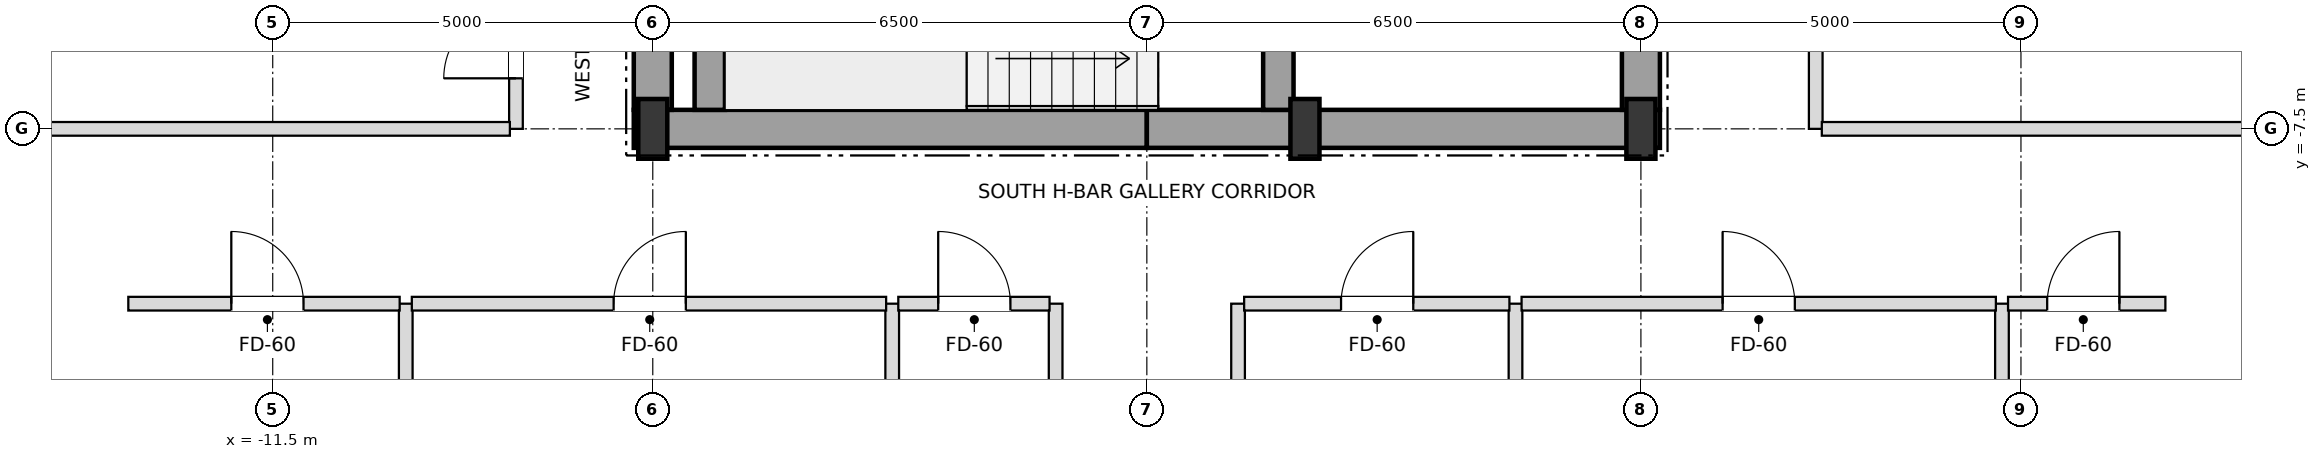
"""IFC4 building model, lengths in metres.
Left out: names, types, materials, properties, quantities, classifications, styles, units other than length and angle.
Written with IfcOpenShell. Run it as: python <this file> out.ifc"""

import sys

from ifc_helpers import new_model, si_unit, direction, frame, frame_2d, origin, origin_2d, place, context, subcontext, project, spatial, rectangle, i_section, extrude, element, fill, save


model = new_model("IFC4")
c1 = context("Model", 3, precision=1e-05, world=origin(), true_north=direction((0.0, 1.0)))
c2 = subcontext(c1, "Body", "Model", "MODEL_VIEW")
j1 = project(units=[si_unit("LENGTHUNIT", "METRE"), si_unit("PLANEANGLEUNIT", "RADIAN")], contexts=[c1])
p1 = place(None, origin())
s1 = spatial("IfcSite", under=j1, at=p1, CompositionType="ELEMENT")
p2 = place(p1, origin())
s2 = spatial("IfcBuilding", under=s1, at=p2, CompositionType="ELEMENT")
p3 = place(p2, frame((0.0, 0.0, 208.8)))
s3 = spatial("IfcBuildingStorey", under=s2, at=p3, CompositionType="ELEMENT", Elevation=208.8)
for number, where, z_axis, x_axis in (
    (1, (-6.5, -7.5, 0.0), (0.0, 0.0, 1.0), (1.0, 0.0, 0.0)),
    (2, (2.08, -7.5, 0.0), (0.0, 0.0, 1.0), (1.0, 0.0, 0.0)),
    (3, (6.5, -7.5, 0.0), (0.0, 0.0, 1.0), (1.0, 0.0, 0.0)),
):
    element("IfcColumn", number, at=place(p3, frame(where, z_axis=z_axis, x_axis=x_axis)), inside=s3, PredefinedType="COLUMN", context=c2, shape_type="SweptSolid", body=[
        extrude(i_section(OverallWidth=0.382, OverallDepth=0.786, WebThickness=0.02, FlangeThickness=0.033, at=origin_2d()), origin(), (0.0, 0.0, 1.0), 3.6),
    ])
for number, where, z_axis, x_axis in (
    (4, (-6.75, -7.5, 0.0), (0.0, 0.0, 1.0), (1.0, 0.0, 0.0)),
    (5, (0.0, -7.5, 0.0), (0.0, 0.0, 1.0), (1.0, 0.0, 0.0)),
):
    element("IfcWall", number, at=place(p3, frame(where, z_axis=z_axis, x_axis=x_axis)), inside=s3, PredefinedType="SHEAR", context=c2, shape_type="SweptSolid", body=[
        extrude(rectangle(XDim=6.75, YDim=0.5, at=frame_2d((3.375, 0.0))), origin(), (0.0, 0.0, 1.0), 3.3),
    ])
p4 = place(p3, frame((-6.5, -7.25, 0.0), z_axis=(0.0, 0.0, 1.0), x_axis=(0.0, 1.0, 0.0)))
e6 = element("IfcWall", 6, at=p4, inside=s3, PredefinedType="SHEAR", context=c2, shape_type="SweptSolid", body=[
    extrude(rectangle(XDim=3.55, YDim=0.5, at=frame_2d((1.775, 0.0))), origin(), (0.0, 0.0, 1.0), 3.3),
])
p5 = place(p3, frame((6.5, -7.25, 0.0), z_axis=(0.0, 0.0, 1.0), x_axis=(0.0, 1.0, 0.0)))
e7 = element("IfcWall", 7, at=p5, inside=s3, PredefinedType="SHEAR", context=c2, shape_type="SweptSolid", body=[
    extrude(rectangle(XDim=5.75, YDim=0.5, at=frame_2d((2.875, 0.0))), origin(), (0.0, 0.0, 1.0), 3.3),
])
p6 = place(p5, frame((0.85, 0.0, 0.0)))
e8 = element("IfcOpeningElement", 8, at=p6, cuts=e7, PredefinedType="OPENING", context=c2, shape_type="SweptSolid", body=[
    extrude(rectangle(XDim=1.05, YDim=2.15, at=frame_2d((0.525, 1.075))), frame((0.0, 0.26, 0.0), z_axis=(0.0, -1.0, 0.0), x_axis=(1.0, 0.0, 0.0)), (0.0, 0.0, 1.0), 0.52),
])
p7 = place(p3, frame((-5.75, -7.25, 0.0), z_axis=(0.0, 0.0, 1.0), x_axis=(0.0, 1.0, 0.0)))
e9 = element("IfcWall", 9, at=p7, inside=s3, PredefinedType="SHEAR", context=c2, shape_type="SweptSolid", body=[
    extrude(rectangle(XDim=2.9, YDim=0.4, at=frame_2d((1.45, 0.0))), origin(), (0.0, 0.0, 1.0), 3.3),
])
p8 = place(p3, frame((1.73, -7.25, 0.0), z_axis=(0.0, 0.0, 1.0), x_axis=(0.0, 1.0, 0.0)))
e10 = element("IfcWall", 10, at=p8, inside=s3, PredefinedType="SHEAR", context=c2, shape_type="SweptSolid", body=[
    extrude(rectangle(XDim=3.3, YDim=0.4, at=frame_2d((1.65, 0.0))), origin(), (0.0, 0.0, 1.0), 3.3),
])
p9 = place(p8, frame((0.9, 0.0, 0.0)))
e11 = element("IfcOpeningElement", 11, at=p9, cuts=e10, PredefinedType="OPENING", context=c2, shape_type="SweptSolid", body=[
    extrude(rectangle(XDim=1.05, YDim=2.15, at=frame_2d((0.525, 1.075))), frame((0.0, 0.21, 0.0), z_axis=(0.0, -1.0, 0.0), x_axis=(1.0, 0.0, 0.0)), (0.0, 0.0, 1.0), 0.42),
])
p10 = place(p3, frame((-9.75, -21.4, 0.0), z_axis=(0.0, 0.0, 1.0), x_axis=(0.0, 1.0, 0.0)))
e12 = element("IfcWall", 12, at=p10, inside=s3, PredefinedType="PARTITIONING", context=c2, shape_type="SweptSolid", body=[
    extrude(rectangle(XDim=11.6, YDim=0.18, at=frame_2d((5.8, 0.0))), origin(), (0.0, 0.0, 1.0), 2.746),
])
p11 = place(p3, frame((-8.3, -7.5, 0.0), z_axis=(0.0, 0.0, 1.0), x_axis=(0.0, 1.0, 0.0)))
e13 = element("IfcWall", 13, at=p11, inside=s3, PredefinedType="PARTITIONING", context=c2, shape_type="SweptSolid", body=[
    extrude(rectangle(XDim=15.0, YDim=0.18, at=frame_2d((7.5, 0.0))), origin(), (0.0, 0.0, 1.0), 3.3),
])
p12 = place(p11, frame((0.665, 0.0, 0.0)))
e14 = element("IfcOpeningElement", 14, at=p12, cuts=e13, PredefinedType="OPENING", context=c2, shape_type="SweptSolid", body=[
    extrude(rectangle(XDim=0.95, YDim=2.15, at=frame_2d((0.475, 1.075))), frame((0.0, 0.1, 0.0), z_axis=(0.0, -1.0, 0.0), x_axis=(1.0, 0.0, 0.0)), (0.0, 0.0, 1.0), 0.2),
])
p13 = place(p11, frame((2.665, 0.0, 0.0)))
e15 = element("IfcOpeningElement", 15, at=p13, cuts=e13, PredefinedType="OPENING", context=c2, shape_type="SweptSolid", body=[
    extrude(rectangle(XDim=0.95, YDim=2.15, at=frame_2d((0.475, 1.075))), frame((0.0, 0.1, 0.0), z_axis=(0.0, -1.0, 0.0), x_axis=(1.0, 0.0, 0.0)), (0.0, 0.0, 1.0), 0.2),
])
for number, where, z_axis, x_axis in (
    (16, (-3.35, -21.4, 0.0), (0.0, 0.0, 1.0), (0.0, 1.0, 0.0)),
    (17, (-1.2, -21.4, 0.0), (0.0, 0.0, 1.0), (0.0, 1.0, 0.0)),
    (18, (1.2, -21.4, 0.0), (0.0, 0.0, 1.0), (0.0, 1.0, 0.0)),
    (19, (4.85, -21.4, 0.0), (0.0, 0.0, 1.0), (0.0, 1.0, 0.0)),
):
    element("IfcWall", number, at=place(p3, frame(where, z_axis=z_axis, x_axis=x_axis)), inside=s3, PredefinedType="PARTITIONING", context=c2, shape_type="SweptSolid", body=[
        extrude(rectangle(XDim=11.6, YDim=0.18, at=frame_2d((5.8, 0.0))), origin(), (0.0, 0.0, 1.0), 2.746),
    ])
p14 = place(p3, frame((8.8, -7.5, 0.0), z_axis=(0.0, 0.0, 1.0), x_axis=(0.0, 1.0, 0.0)))
e20 = element("IfcWall", 20, at=p14, inside=s3, PredefinedType="PARTITIONING", context=c2, shape_type="SweptSolid", body=[
    extrude(rectangle(XDim=15.0, YDim=0.18, at=frame_2d((7.5, 0.0))), origin(), (0.0, 0.0, 1.0), 3.3),
])
p15 = place(p14, frame((2.075, 0.0, 0.0)))
e21 = element("IfcOpeningElement", 21, at=p15, cuts=e20, PredefinedType="OPENING", context=c2, shape_type="SweptSolid", body=[
    extrude(rectangle(XDim=0.95, YDim=2.15, at=frame_2d((0.475, 1.075))), frame((0.0, 0.1, 0.0), z_axis=(0.0, -1.0, 0.0), x_axis=(1.0, 0.0, 0.0)), (0.0, 0.0, 1.0), 0.2),
])
p16 = place(p14, frame((8.325, 0.0, 0.0)))
e22 = element("IfcOpeningElement", 22, at=p16, cuts=e20, PredefinedType="OPENING", context=c2, shape_type="SweptSolid", body=[
    extrude(rectangle(XDim=0.95, YDim=2.15, at=frame_2d((0.475, 1.075))), frame((0.0, 0.1, 0.0), z_axis=(0.0, -1.0, 0.0), x_axis=(1.0, 0.0, 0.0)), (0.0, 0.0, 1.0), 0.2),
])
p17 = place(p14, frame((13.275, 0.0, 0.0)))
e23 = element("IfcOpeningElement", 23, at=p17, cuts=e20, PredefinedType="OPENING", context=c2, shape_type="SweptSolid", body=[
    extrude(rectangle(XDim=0.95, YDim=2.15, at=frame_2d((0.475, 1.075))), frame((0.0, 0.1, 0.0), z_axis=(0.0, -1.0, 0.0), x_axis=(1.0, 0.0, 0.0)), (0.0, 0.0, 1.0), 0.2),
])
p18 = place(p3, frame((11.25, -21.4, 0.0), z_axis=(0.0, 0.0, 1.0), x_axis=(0.0, 1.0, 0.0)))
e24 = element("IfcWall", 24, at=p18, inside=s3, PredefinedType="PARTITIONING", context=c2, shape_type="SweptSolid", body=[
    extrude(rectangle(XDim=11.6, YDim=0.18, at=frame_2d((5.8, 0.0))), origin(), (0.0, 0.0, 1.0), 2.59),
])
p19 = place(p3, frame((-13.4, -9.8, 0.0), z_axis=(0.0, 0.0, 1.0), x_axis=(1.0, 0.0, 0.0)))
e25 = element("IfcWall", 25, at=p19, inside=s3, PredefinedType="PARTITIONING", context=c2, shape_type="SweptSolid", body=[
    extrude(rectangle(XDim=3.57, YDim=0.18, at=frame_2d((1.785, 0.0))), origin(), (0.0, 0.0, 1.0), 3.3),
])
p20 = place(p19, frame((1.355, 0.0, 0.0)))
e26 = element("IfcOpeningElement", 26, at=p20, cuts=e25, PredefinedType="OPENING", context=c2, shape_type="SweptSolid", body=[
    extrude(rectangle(XDim=0.95, YDim=2.15, at=frame_2d((0.475, 1.075))), frame((0.0, 0.1, 0.0), z_axis=(0.0, -1.0, 0.0), x_axis=(1.0, 0.0, 0.0)), (0.0, 0.0, 1.0), 0.2),
])
p21 = place(p3, frame((-9.67, -9.8, 0.0), z_axis=(0.0, 0.0, 1.0), x_axis=(1.0, 0.0, 0.0)))
e27 = element("IfcWall", 27, at=p21, inside=s3, PredefinedType="PARTITIONING", context=c2, shape_type="SweptSolid", body=[
    extrude(rectangle(XDim=6.24, YDim=0.18, at=frame_2d((3.12, 0.0))), origin(), (0.0, 0.0, 1.0), 2.746),
])
p22 = place(p21, frame((2.655, 0.0, 0.0)))
e28 = element("IfcOpeningElement", 28, at=p22, cuts=e27, PredefinedType="OPENING", context=c2, shape_type="SweptSolid", body=[
    extrude(rectangle(XDim=0.95, YDim=2.15, at=frame_2d((0.475, 1.075))), frame((0.0, 0.1, 0.0), z_axis=(0.0, -1.0, 0.0), x_axis=(1.0, 0.0, 0.0)), (0.0, 0.0, 1.0), 0.2),
])
p23 = place(p3, frame((-3.27, -9.8, 0.0), z_axis=(0.0, 0.0, 1.0), x_axis=(1.0, 0.0, 0.0)))
e29 = element("IfcWall", 29, at=p23, inside=s3, PredefinedType="PARTITIONING", context=c2, shape_type="SweptSolid", body=[
    extrude(rectangle(XDim=1.99, YDim=0.18, at=frame_2d((0.995, 0.0))), origin(), (0.0, 0.0, 1.0), 3.3),
])
p24 = place(p23, frame((0.525, 0.0, 0.0)))
e30 = element("IfcOpeningElement", 30, at=p24, cuts=e29, PredefinedType="OPENING", context=c2, shape_type="SweptSolid", body=[
    extrude(rectangle(XDim=0.95, YDim=2.15, at=frame_2d((0.475, 1.075))), frame((0.0, 0.1, 0.0), z_axis=(0.0, -1.0, 0.0), x_axis=(1.0, 0.0, 0.0)), (0.0, 0.0, 1.0), 0.2),
])
p25 = place(p3, frame((1.28, -9.8, 0.0), z_axis=(0.0, 0.0, 1.0), x_axis=(1.0, 0.0, 0.0)))
e31 = element("IfcWall", 31, at=p25, inside=s3, PredefinedType="PARTITIONING", context=c2, shape_type="SweptSolid", body=[
    extrude(rectangle(XDim=3.49, YDim=0.18, at=frame_2d((1.745, 0.0))), origin(), (0.0, 0.0, 1.0), 3.3),
])
p26 = place(p25, frame((1.275, 0.0, 0.0)))
e32 = element("IfcOpeningElement", 32, at=p26, cuts=e31, PredefinedType="OPENING", context=c2, shape_type="SweptSolid", body=[
    extrude(rectangle(XDim=0.95, YDim=2.15, at=frame_2d((0.475, 1.075))), frame((0.0, 0.1, 0.0), z_axis=(0.0, -1.0, 0.0), x_axis=(1.0, 0.0, 0.0)), (0.0, 0.0, 1.0), 0.2),
])
p27 = place(p3, frame((4.93, -9.8, 0.0), z_axis=(0.0, 0.0, 1.0), x_axis=(1.0, 0.0, 0.0)))
e33 = element("IfcWall", 33, at=p27, inside=s3, PredefinedType="PARTITIONING", context=c2, shape_type="SweptSolid", body=[
    extrude(rectangle(XDim=6.24, YDim=0.18, at=frame_2d((3.12, 0.0))), origin(), (0.0, 0.0, 1.0), 2.746),
])
p28 = place(p27, frame((2.645, 0.0, 0.0)))
e34 = element("IfcOpeningElement", 34, at=p28, cuts=e33, PredefinedType="OPENING", context=c2, shape_type="SweptSolid", body=[
    extrude(rectangle(XDim=0.95, YDim=2.15, at=frame_2d((0.475, 1.075))), frame((0.0, 0.1, 0.0), z_axis=(0.0, -1.0, 0.0), x_axis=(1.0, 0.0, 0.0)), (0.0, 0.0, 1.0), 0.2),
])
p29 = place(p3, frame((11.33, -9.8, 0.0), z_axis=(0.0, 0.0, 1.0), x_axis=(1.0, 0.0, 0.0)))
e35 = element("IfcWall", 35, at=p29, inside=s3, PredefinedType="PARTITIONING", context=c2, shape_type="SweptSolid", body=[
    extrude(rectangle(XDim=2.07, YDim=0.18, at=frame_2d((1.035, 0.0))), origin(), (0.0, 0.0, 1.0), 3.3),
])
p30 = place(p29, frame((0.515, 0.0, 0.0)))
e36 = element("IfcOpeningElement", 36, at=p30, cuts=e35, PredefinedType="OPENING", context=c2, shape_type="SweptSolid", body=[
    extrude(rectangle(XDim=0.95, YDim=2.15, at=frame_2d((0.475, 1.075))), frame((0.0, 0.1, 0.0), z_axis=(0.0, -1.0, 0.0), x_axis=(1.0, 0.0, 0.0)), (0.0, 0.0, 1.0), 0.2),
])
p31 = place(p3, frame((-18.4, -7.5, 0.0), z_axis=(0.0, 0.0, 1.0), x_axis=(1.0, 0.0, 0.0)))
e37 = element("IfcWall", 37, at=p31, inside=s3, PredefinedType="PARTITIONING", context=c2, shape_type="SweptSolid", body=[
    extrude(rectangle(XDim=10.02, YDim=0.18, at=frame_2d((5.01, 0.0))), origin(), (0.0, 0.0, 1.0), 2.746),
])
p32 = place(p3, frame((8.88, -7.5, 0.0), z_axis=(0.0, 0.0, 1.0), x_axis=(1.0, 0.0, 0.0)))
e38 = element("IfcWall", 38, at=p32, inside=s3, PredefinedType="PARTITIONING", context=c2, shape_type="SweptSolid", body=[
    extrude(rectangle(XDim=9.52, YDim=0.18, at=frame_2d((4.76, 0.0))), origin(), (0.0, 0.0, 1.0), 2.746),
])
p33 = place(p20, origin())
e39 = element("IfcDoor", 39, at=p33, inside=s3, OperationType="SINGLE_SWING_LEFT", PredefinedType="DOOR", context=c2, shape_type="SweptSolid", body=[
    extrude(rectangle(XDim=0.95, YDim=2.15, at=frame_2d((0.475, 1.075))), frame((0.0, 0.025, 0.0), z_axis=(0.0, -1.0, 0.0), x_axis=(1.0, 0.0, 0.0)), (0.0, 0.0, 1.0), 0.05),
])
fill(e26, e39)
p34 = place(p22, origin())
e40 = element("IfcDoor", 40, at=p34, inside=s3, OperationType="SINGLE_SWING_RIGHT", PredefinedType="DOOR", context=c2, shape_type="SweptSolid", body=[
    extrude(rectangle(XDim=0.95, YDim=2.15, at=frame_2d((0.475, 1.075))), frame((0.0, 0.025, 0.0), z_axis=(0.0, -1.0, 0.0), x_axis=(1.0, 0.0, 0.0)), (0.0, 0.0, 1.0), 0.05),
])
fill(e28, e40)
p35 = place(p24, origin())
e41 = element("IfcDoor", 41, at=p35, inside=s3, OperationType="SINGLE_SWING_LEFT", PredefinedType="DOOR", context=c2, shape_type="SweptSolid", body=[
    extrude(rectangle(XDim=0.95, YDim=2.15, at=frame_2d((0.475, 1.075))), frame((0.0, 0.025, 0.0), z_axis=(0.0, -1.0, 0.0), x_axis=(1.0, 0.0, 0.0)), (0.0, 0.0, 1.0), 0.05),
])
fill(e30, e41)
p36 = place(p26, origin())
e42 = element("IfcDoor", 42, at=p36, inside=s3, OperationType="SINGLE_SWING_RIGHT", PredefinedType="DOOR", context=c2, shape_type="SweptSolid", body=[
    extrude(rectangle(XDim=0.95, YDim=2.15, at=frame_2d((0.475, 1.075))), frame((0.0, 0.025, 0.0), z_axis=(0.0, -1.0, 0.0), x_axis=(1.0, 0.0, 0.0)), (0.0, 0.0, 1.0), 0.05),
])
fill(e32, e42)
p37 = place(p28, origin())
e43 = element("IfcDoor", 43, at=p37, inside=s3, OperationType="SINGLE_SWING_LEFT", PredefinedType="DOOR", context=c2, shape_type="SweptSolid", body=[
    extrude(rectangle(XDim=0.95, YDim=2.15, at=frame_2d((0.475, 1.075))), frame((0.0, 0.025, 0.0), z_axis=(0.0, -1.0, 0.0), x_axis=(1.0, 0.0, 0.0)), (0.0, 0.0, 1.0), 0.05),
])
fill(e34, e43)
p38 = place(p30, origin())
e44 = element("IfcDoor", 44, at=p38, inside=s3, OperationType="SINGLE_SWING_RIGHT", PredefinedType="DOOR", context=c2, shape_type="SweptSolid", body=[
    extrude(rectangle(XDim=0.95, YDim=2.15, at=frame_2d((0.475, 1.075))), frame((0.0, 0.025, 0.0), z_axis=(0.0, -1.0, 0.0), x_axis=(1.0, 0.0, 0.0)), (0.0, 0.0, 1.0), 0.05),
])
fill(e36, e44)
p39 = place(p12, origin())
e45 = element("IfcDoor", 45, at=p39, inside=s3, OperationType="SINGLE_SWING_LEFT", PredefinedType="DOOR", context=c2, shape_type="SweptSolid", body=[
    extrude(rectangle(XDim=0.95, YDim=2.15, at=frame_2d((0.475, 1.075))), frame((0.0, 0.025, 0.0), z_axis=(0.0, -1.0, 0.0), x_axis=(1.0, 0.0, 0.0)), (0.0, 0.0, 1.0), 0.05),
])
fill(e14, e45)
save(model, sys.argv[1])
